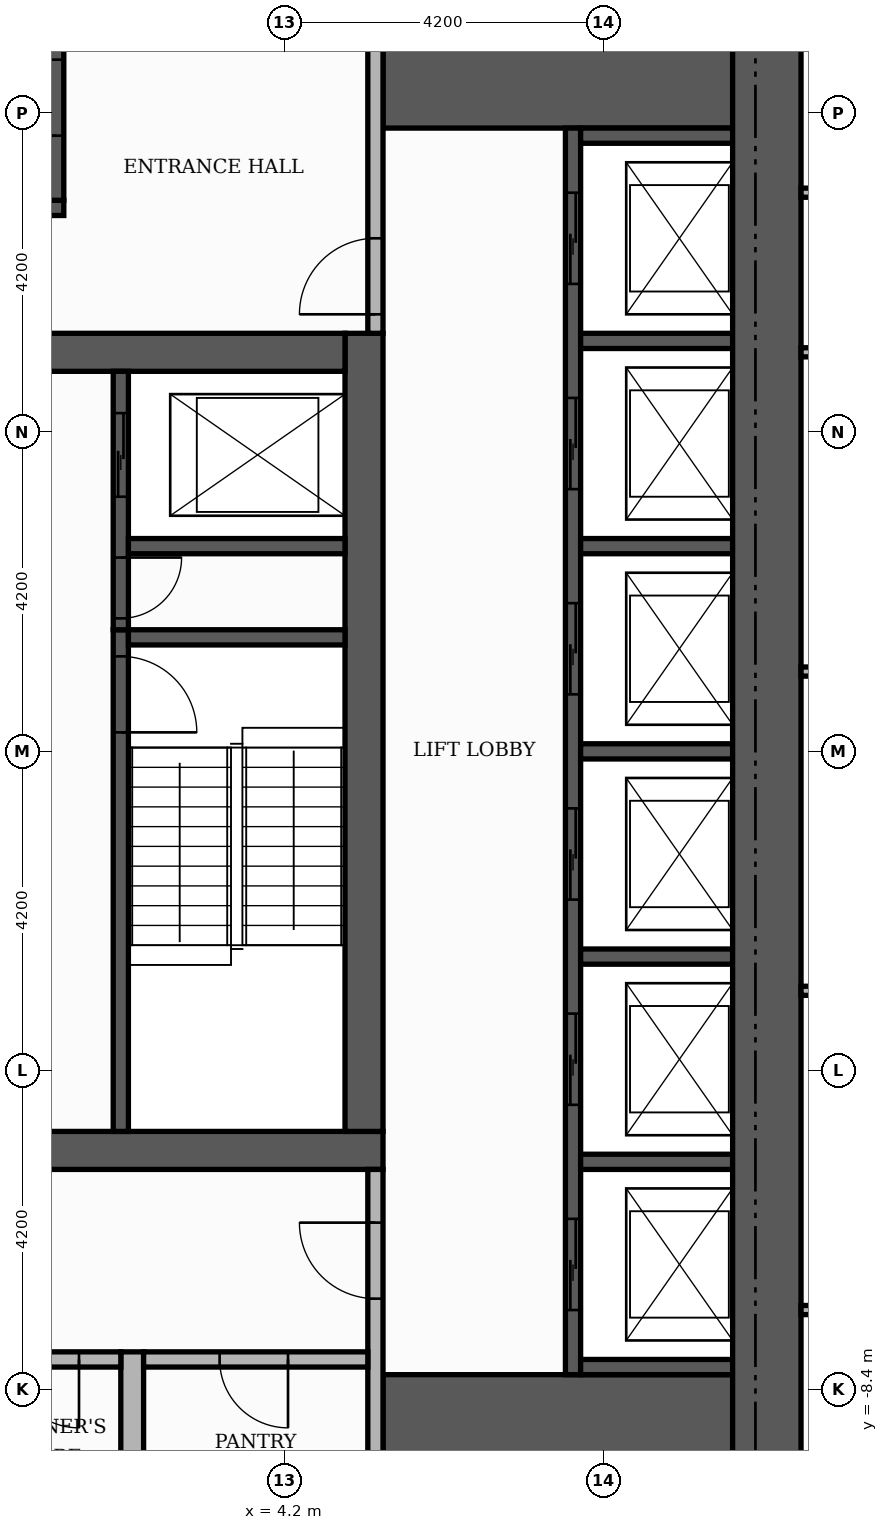
"""IFC4 building model, lengths in metres.
Left out: names, types, materials, properties, quantities, classifications, styles, units other than length and angle.
Written with IfcOpenShell. Run it as: python <this file> out.ifc"""

import sys

from ifc_helpers import new_model, si_unit, direction, frame, frame_2d, origin, place, context, subcontext, project, spatial, rectangle, extrude, element, fill, save


model = new_model("IFC4")
c1 = context("Model", 3, precision=1e-05, world=origin(), true_north=direction((0.0, 1.0)))
c2 = subcontext(c1, "Body", "Model", "MODEL_VIEW")
j1 = project(units=[si_unit("LENGTHUNIT", "METRE"), si_unit("PLANEANGLEUNIT", "RADIAN")], contexts=[c1])
p1 = place(None, origin())
s1 = spatial("IfcSite", under=j1, at=p1, CompositionType="ELEMENT")
p2 = place(p1, origin())
s2 = spatial("IfcBuilding", under=s1, at=p2, CompositionType="ELEMENT")
p3 = place(p2, frame((0.0, 0.0, 248.4)))
s3 = spatial("IfcBuildingStorey", under=s2, at=p3, CompositionType="ELEMENT", Elevation=248.4)
p4 = place(p3, frame((-5.5, -5.25, 0.0), z_axis=(0.0, 0.0, 1.0), x_axis=(1.0, 0.0, 0.0)))
e1 = element("IfcWall", 1, at=p4, inside=s3, PredefinedType="SHEAR", context=c2, shape_type="SweptSolid", body=[
    extrude(rectangle(XDim=11.0, YDim=0.5, at=frame_2d((5.5, 0.0))), origin(), (0.0, 0.0, 1.0), 3.48),
])
p5 = place(p4, frame((4.9, 0.0, 0.0)))
e2 = element("IfcOpeningElement", 2, at=p5, cuts=e1, PredefinedType="OPENING", context=c2, shape_type="SweptSolid", body=[
    extrude(rectangle(XDim=1.2, YDim=2.1, at=frame_2d((0.6, 1.05))), frame((0.0, 0.26, 0.0), z_axis=(0.0, -1.0, 0.0), x_axis=(1.0, 0.0, 0.0)), (0.0, 0.0, 1.0), 0.52),
])
p6 = place(p3, frame((5.25, -5.0, 0.0), z_axis=(0.0, 0.0, 1.0), x_axis=(0.0, 1.0, 0.0)))
e3 = element("IfcWall", 3, at=p6, inside=s3, PredefinedType="SHEAR", context=c2, shape_type="SweptSolid", body=[
    extrude(rectangle(XDim=10.5, YDim=0.5, at=frame_2d((5.25, 0.0))), origin(), (0.0, 0.0, 1.0), 3.48),
])
p7 = place(p3, frame((-5.0, 5.25, 0.0), z_axis=(0.0, 0.0, 1.0), x_axis=(1.0, 0.0, 0.0)))
e4 = element("IfcWall", 4, at=p7, inside=s3, PredefinedType="SHEAR", context=c2, shape_type="SweptSolid", body=[
    extrude(rectangle(XDim=10.0, YDim=0.5, at=frame_2d((5.0, 0.0))), origin(), (0.0, 0.0, 1.0), 3.48),
])
p8 = place(p7, frame((4.4, 0.0, 0.0)))
e5 = element("IfcOpeningElement", 5, at=p8, cuts=e4, PredefinedType="OPENING", context=c2, shape_type="SweptSolid", body=[
    extrude(rectangle(XDim=1.2, YDim=2.1, at=frame_2d((0.6, 1.05))), frame((0.0, 0.26, 0.0), z_axis=(0.0, -1.0, 0.0), x_axis=(1.0, 0.0, 0.0)), (0.0, 0.0, 1.0), 0.52),
])
for number, where, z_axis, x_axis in (
    (6, (5.5, -9.15, 0.0), (0.0, 0.0, 1.0), (1.0, 0.0, 0.0)),
    (7, (5.5, 9.15, 0.0), (0.0, 0.0, 1.0), (1.0, 0.0, 0.0)),
):
    element("IfcWall", number, at=place(p3, frame(where, z_axis=z_axis, x_axis=x_axis)), inside=s3, PredefinedType="SHEAR", context=c2, shape_type="SweptSolid", body=[
        extrude(rectangle(XDim=4.6, YDim=1.9, at=frame_2d((2.3, 0.0))), origin(), (0.0, 0.0, 1.0), 3.48),
    ])
p9 = place(p3, frame((2.05, -5.0, 0.0), z_axis=(0.0, 0.0, 1.0), x_axis=(0.0, 1.0, 0.0)))
e8 = element("IfcWall", 8, at=p9, inside=s3, PredefinedType="SHEAR", context=c2, shape_type="SweptSolid", body=[
    extrude(rectangle(XDim=6.6, YDim=0.2, at=frame_2d((3.3, 0.0))), origin(), (0.0, 0.0, 1.0), 3.48),
])
p10 = place(p9, frame((5.25, 0.0, 0.0)))
e9 = element("IfcOpeningElement", 9, at=p10, cuts=e8, PredefinedType="OPENING", context=c2, shape_type="SweptSolid", body=[
    extrude(rectangle(XDim=1.0, YDim=2.1, at=frame_2d((0.5, 1.05))), frame((0.0, 0.11, 0.0), z_axis=(0.0, -1.0, 0.0), x_axis=(1.0, 0.0, 0.0)), (0.0, 0.0, 1.0), 0.22),
])
p11 = place(p3, frame((2.15, 1.5, 0.0), z_axis=(0.0, 0.0, 1.0), x_axis=(1.0, 0.0, 0.0)))
e10 = element("IfcWall", 10, at=p11, inside=s3, PredefinedType="SHEAR", context=c2, shape_type="SweptSolid", body=[
    extrude(rectangle(XDim=2.85, YDim=0.2, at=frame_2d((1.425, 0.0))), origin(), (0.0, 0.0, 1.0), 3.48),
])
p12 = place(p3, frame((-5.5, 7.15, 0.0), z_axis=(0.0, 0.0, 1.0), x_axis=(1.0, 0.0, 0.0)))
e11 = element("IfcWall", 11, at=p12, inside=s3, PredefinedType="SHEAR", context=c2, shape_type="SweptSolid", body=[
    extrude(rectangle(XDim=6.8, YDim=0.2, at=frame_2d((3.4, 0.0))), origin(), (0.0, 0.0, 1.0), 3.48),
])
p13 = place(p3, frame((1.2, 7.25, 0.0), z_axis=(0.0, 0.0, 1.0), x_axis=(0.0, 1.0, 0.0)))
e12 = element("IfcWall", 12, at=p13, inside=s3, PredefinedType="SHEAR", context=c2, shape_type="SweptSolid", body=[
    extrude(rectangle(XDim=2.85, YDim=0.2, at=frame_2d((1.425, 0.0))), origin(), (0.0, 0.0, 1.0), 3.48),
])
p14 = place(p13, frame((0.85, 0.0, 0.0)))
e13 = element("IfcOpeningElement", 13, at=p14, cuts=e12, PredefinedType="OPENING", context=c2, shape_type="SweptSolid", body=[
    extrude(rectangle(XDim=1.0, YDim=2.1, at=frame_2d((0.5, 1.05))), frame((0.0, 0.11, 0.0), z_axis=(0.0, -1.0, 0.0), x_axis=(1.0, 0.0, 0.0)), (0.0, 0.0, 1.0), 0.22),
])
p15 = place(p3, frame((8.0, -8.2, 0.0), z_axis=(0.0, 0.0, 1.0), x_axis=(0.0, 1.0, 0.0)))
e14 = element("IfcWall", 14, at=p15, inside=s3, PredefinedType="SHEAR", context=c2, shape_type="SweptSolid", body=[
    extrude(rectangle(XDim=16.4, YDim=0.2, at=frame_2d((8.2, 0.0))), origin(), (0.0, 0.0, 1.0), 3.48),
])
p16 = place(p15, frame((0.85, 0.0, 0.0)))
e15 = element("IfcOpeningElement", 15, at=p16, cuts=e14, PredefinedType="OPENING", context=c2, shape_type="SweptSolid", body=[
    extrude(rectangle(XDim=1.2, YDim=2.1, at=frame_2d((0.6, 1.05))), frame((0.0, 0.11, 0.0), z_axis=(0.0, -1.0, 0.0), x_axis=(1.0, 0.0, 0.0)), (0.0, 0.0, 1.0), 0.22),
])
p17 = place(p15, frame((3.55, 0.0, 0.0)))
e16 = element("IfcOpeningElement", 16, at=p17, cuts=e14, PredefinedType="OPENING", context=c2, shape_type="SweptSolid", body=[
    extrude(rectangle(XDim=1.2, YDim=2.1, at=frame_2d((0.6, 1.05))), frame((0.0, 0.11, 0.0), z_axis=(0.0, -1.0, 0.0), x_axis=(1.0, 0.0, 0.0)), (0.0, 0.0, 1.0), 0.22),
])
p18 = place(p15, frame((6.25, 0.0, 0.0)))
e17 = element("IfcOpeningElement", 17, at=p18, cuts=e14, PredefinedType="OPENING", context=c2, shape_type="SweptSolid", body=[
    extrude(rectangle(XDim=1.2, YDim=2.1, at=frame_2d((0.6, 1.05))), frame((0.0, 0.11, 0.0), z_axis=(0.0, -1.0, 0.0), x_axis=(1.0, 0.0, 0.0)), (0.0, 0.0, 1.0), 0.22),
])
p19 = place(p15, frame((8.95, 0.0, 0.0)))
e18 = element("IfcOpeningElement", 18, at=p19, cuts=e14, PredefinedType="OPENING", context=c2, shape_type="SweptSolid", body=[
    extrude(rectangle(XDim=1.2, YDim=2.1, at=frame_2d((0.6, 1.05))), frame((0.0, 0.11, 0.0), z_axis=(0.0, -1.0, 0.0), x_axis=(1.0, 0.0, 0.0)), (0.0, 0.0, 1.0), 0.22),
])
p20 = place(p15, frame((11.65, 0.0, 0.0)))
e19 = element("IfcOpeningElement", 19, at=p20, cuts=e14, PredefinedType="OPENING", context=c2, shape_type="SweptSolid", body=[
    extrude(rectangle(XDim=1.2, YDim=2.1, at=frame_2d((0.6, 1.05))), frame((0.0, 0.11, 0.0), z_axis=(0.0, -1.0, 0.0), x_axis=(1.0, 0.0, 0.0)), (0.0, 0.0, 1.0), 0.22),
])
p21 = place(p15, frame((14.35, 0.0, 0.0)))
e20 = element("IfcOpeningElement", 20, at=p21, cuts=e14, PredefinedType="OPENING", context=c2, shape_type="SweptSolid", body=[
    extrude(rectangle(XDim=1.2, YDim=2.1, at=frame_2d((0.6, 1.05))), frame((0.0, 0.11, 0.0), z_axis=(0.0, -1.0, 0.0), x_axis=(1.0, 0.0, 0.0)), (0.0, 0.0, 1.0), 0.22),
])
for number, where, z_axis, x_axis in (
    (21, (8.1, -8.1, 0.0), (0.0, 0.0, 1.0), (1.0, 0.0, 0.0)),
    (22, (8.1, -5.4, 0.0), (0.0, 0.0, 1.0), (1.0, 0.0, 0.0)),
    (23, (8.1, -2.7, 0.0), (0.0, 0.0, 1.0), (1.0, 0.0, 0.0)),
    (24, (8.1, 0.0, 0.0), (0.0, 0.0, 1.0), (1.0, 0.0, 0.0)),
):
    element("IfcWall", number, at=place(p3, frame(where, z_axis=z_axis, x_axis=x_axis)), inside=s3, PredefinedType="SHEAR", context=c2, shape_type="SweptSolid", body=[
        extrude(rectangle(XDim=2.0, YDim=0.2, at=frame_2d((1.0, 0.0))), origin(), (0.0, 0.0, 1.0), 3.48),
    ])
p22 = place(p3, frame((2.05, 1.6, 0.0), z_axis=(0.0, 0.0, 1.0), x_axis=(0.0, 1.0, 0.0)))
e25 = element("IfcWall", 25, at=p22, inside=s3, PredefinedType="SHEAR", context=c2, shape_type="SweptSolid", body=[
    extrude(rectangle(XDim=3.4, YDim=0.2, at=frame_2d((1.7, 0.0))), origin(), (0.0, 0.0, 1.0), 3.48),
])
p23 = place(p22, frame((1.75, 0.0, 0.0)))
e26 = element("IfcOpeningElement", 26, at=p23, cuts=e25, PredefinedType="OPENING", context=c2, shape_type="SweptSolid", body=[
    extrude(rectangle(XDim=1.1, YDim=2.1, at=frame_2d((0.55, 1.05))), frame((0.0, 0.11, 0.0), z_axis=(0.0, -1.0, 0.0), x_axis=(1.0, 0.0, 0.0)), (0.0, 0.0, 1.0), 0.22),
])
p24 = place(p22, frame((0.15, 0.0, 0.0)))
e27 = element("IfcOpeningElement", 27, at=p24, cuts=e25, PredefinedType="OPENING", context=c2, shape_type="SweptSolid", body=[
    extrude(rectangle(XDim=0.8, YDim=2.1, at=frame_2d((0.4, 1.05))), frame((0.0, 0.11, 0.0), z_axis=(0.0, -1.0, 0.0), x_axis=(1.0, 0.0, 0.0)), (0.0, 0.0, 1.0), 0.22),
])
p25 = place(p3, frame((2.15, 2.7, 0.0), z_axis=(0.0, 0.0, 1.0), x_axis=(1.0, 0.0, 0.0)))
e28 = element("IfcWall", 28, at=p25, inside=s3, PredefinedType="SHEAR", context=c2, shape_type="SweptSolid", body=[
    extrude(rectangle(XDim=2.85, YDim=0.2, at=frame_2d((1.425, 0.0))), origin(), (0.0, 0.0, 1.0), 3.48),
])
for number, where, z_axis, x_axis in (
    (29, (8.1, 2.7, 0.0), (0.0, 0.0, 1.0), (1.0, 0.0, 0.0)),
    (30, (8.1, 5.4, 0.0), (0.0, 0.0, 1.0), (1.0, 0.0, 0.0)),
    (31, (8.1, 8.1, 0.0), (0.0, 0.0, 1.0), (1.0, 0.0, 0.0)),
):
    element("IfcWall", number, at=place(p3, frame(where, z_axis=z_axis, x_axis=x_axis)), inside=s3, PredefinedType="SHEAR", context=c2, shape_type="SweptSolid", body=[
        extrude(rectangle(XDim=2.0, YDim=0.2, at=frame_2d((1.0, 0.0))), origin(), (0.0, 0.0, 1.0), 3.48),
    ])
p26 = place(p3, frame((10.55, -10.1, 0.0), z_axis=(0.0, 0.0, 1.0), x_axis=(0.0, 1.0, 0.0)))
e32 = element("IfcWall", 32, at=p26, inside=s3, PredefinedType="SHEAR", context=c2, shape_type="SweptSolid", body=[
    extrude(rectangle(XDim=20.2, YDim=0.9, at=frame_2d((10.1, 0.0))), origin(), (0.0, 0.0, 1.0), 3.48),
])
p27 = place(p3, frame((2.2, -10.1, 0.0), z_axis=(0.0, 0.0, 1.0), x_axis=(0.0, 1.0, 0.0)))
e33 = element("IfcWall", 33, at=p27, inside=s3, PredefinedType="PARTITIONING", context=c2, shape_type="SweptSolid", body=[
    extrude(rectangle(XDim=2.2, YDim=0.3, at=frame_2d((1.1, 0.0))), origin(), (0.0, 0.0, 1.0), 3.48),
])
p28 = place(p3, frame((5.4, -10.1, 0.0), z_axis=(0.0, 0.0, 1.0), x_axis=(0.0, 1.0, 0.0)))
e34 = element("IfcWall", 34, at=p28, inside=s3, PredefinedType="PARTITIONING", context=c2, shape_type="SweptSolid", body=[
    extrude(rectangle(XDim=4.6, YDim=0.2, at=frame_2d((2.3, 0.0))), origin(), (0.0, 0.0, 1.0), 3.48),
])
p29 = place(p28, frame((2.9, 0.0, 0.0)))
e35 = element("IfcOpeningElement", 35, at=p29, cuts=e34, PredefinedType="OPENING", context=c2, shape_type="SweptSolid", body=[
    extrude(rectangle(XDim=1.0, YDim=2.1, at=frame_2d((0.5, 1.05))), frame((0.0, 0.11, 0.0), z_axis=(0.0, -1.0, 0.0), x_axis=(1.0, 0.0, 0.0)), (0.0, 0.0, 1.0), 0.22),
])
p30 = place(p3, frame((0.1, -8.0, 0.0), z_axis=(0.0, 0.0, 1.0), x_axis=(1.0, 0.0, 0.0)))
e36 = element("IfcWall", 36, at=p30, inside=s3, PredefinedType="PARTITIONING", context=c2, shape_type="SweptSolid", body=[
    extrude(rectangle(XDim=1.95, YDim=0.2, at=frame_2d((0.975, 0.0))), origin(), (0.0, 0.0, 1.0), 3.48),
])
p31 = place(p30, frame((0.5, 0.0, 0.0)))
e37 = element("IfcOpeningElement", 37, at=p31, cuts=e36, PredefinedType="OPENING", context=c2, shape_type="SweptSolid", body=[
    extrude(rectangle(XDim=0.9, YDim=2.1, at=frame_2d((0.45, 1.05))), frame((0.0, 0.11, 0.0), z_axis=(0.0, -1.0, 0.0), x_axis=(1.0, 0.0, 0.0)), (0.0, 0.0, 1.0), 0.22),
])
p32 = place(p3, frame((2.35, -8.0, 0.0), z_axis=(0.0, 0.0, 1.0), x_axis=(1.0, 0.0, 0.0)))
e38 = element("IfcWall", 38, at=p32, inside=s3, PredefinedType="PARTITIONING", context=c2, shape_type="SweptSolid", body=[
    extrude(rectangle(XDim=2.95, YDim=0.2, at=frame_2d((1.475, 0.0))), origin(), (0.0, 0.0, 1.0), 3.48),
])
p33 = place(p32, frame((1.0, 0.0, 0.0)))
e39 = element("IfcOpeningElement", 39, at=p33, cuts=e38, PredefinedType="OPENING", context=c2, shape_type="SweptSolid", body=[
    extrude(rectangle(XDim=0.9, YDim=2.1, at=frame_2d((0.45, 1.05))), frame((0.0, 0.11, 0.0), z_axis=(0.0, -1.0, 0.0), x_axis=(1.0, 0.0, 0.0)), (0.0, 0.0, 1.0), 0.22),
])
p34 = place(p3, frame((5.4, 5.5, 0.0), z_axis=(0.0, 0.0, 1.0), x_axis=(0.0, 1.0, 0.0)))
e40 = element("IfcWall", 40, at=p34, inside=s3, PredefinedType="PARTITIONING", context=c2, shape_type="SweptSolid", body=[
    extrude(rectangle(XDim=4.6, YDim=0.2, at=frame_2d((2.3, 0.0))), origin(), (0.0, 0.0, 1.0), 3.48),
])
p35 = place(p34, frame((0.25, 0.0, 0.0)))
e41 = element("IfcOpeningElement", 41, at=p35, cuts=e40, PredefinedType="OPENING", context=c2, shape_type="SweptSolid", body=[
    extrude(rectangle(XDim=1.0, YDim=2.1, at=frame_2d((0.5, 1.05))), frame((0.0, 0.11, 0.0), z_axis=(0.0, -1.0, 0.0), x_axis=(1.0, 0.0, 0.0)), (0.0, 0.0, 1.0), 0.22),
])
p36 = place(p3, frame((11.0, -7.35, 0.0), z_axis=(0.0, 0.0, 1.0), x_axis=(1.0, 0.0, 0.0)))
e42 = element("IfcWall", 42, at=p36, inside=s3, PredefinedType="PARTITIONING", context=c2, shape_type="SweptSolid", body=[
    extrude(rectangle(XDim=8.22, YDim=0.12, at=frame_2d((4.11, 0.0))), origin(), (0.0, 0.0, 1.0), 3.48),
])
p37 = place(p36, frame((3.66, 0.0, 0.0)))
e43 = element("IfcOpeningElement", 43, at=p37, cuts=e42, PredefinedType="OPENING", context=c2, shape_type="SweptSolid", body=[
    extrude(rectangle(XDim=0.9, YDim=2.1, at=frame_2d((0.45, 1.05))), frame((0.0, 0.07, 0.0), z_axis=(0.0, -1.0, 0.0), x_axis=(1.0, 0.0, 0.0)), (0.0, 0.0, 1.0), 0.14),
])
for number, where, z_axis, x_axis in (
    (44, (11.0, -3.15, 0.0), (0.0, 0.0, 1.0), (1.0, 0.0, 0.0)),
    (45, (11.0, 1.05, 0.0), (0.0, 0.0, 1.0), (1.0, 0.0, 0.0)),
    (46, (11.0, 5.25, 0.0), (0.0, 0.0, 1.0), (1.0, 0.0, 0.0)),
    (47, (11.0, 7.35, 0.0), (0.0, 0.0, 1.0), (1.0, 0.0, 0.0)),
):
    element("IfcWall", number, at=place(p3, frame(where, z_axis=z_axis, x_axis=x_axis)), inside=s3, PredefinedType="PARTITIONING", context=c2, shape_type="SweptSolid", body=[
        extrude(rectangle(XDim=8.22, YDim=0.12, at=frame_2d((4.11, 0.0))), origin(), (0.0, 0.0, 1.0), 3.48),
    ])
p38 = place(p16, origin())
e48 = element("IfcDoor", 48, at=p38, inside=s3, OperationType="SLIDING_TO_LEFT", PredefinedType="DOOR", context=c2, shape_type="SweptSolid", body=[
    extrude(rectangle(XDim=1.2, YDim=2.1, at=frame_2d((0.6, 1.05))), frame((0.0, 0.025, 0.0), z_axis=(0.0, -1.0, 0.0), x_axis=(1.0, 0.0, 0.0)), (0.0, 0.0, 1.0), 0.05),
])
fill(e15, e48)
p39 = place(p17, origin())
e49 = element("IfcDoor", 49, at=p39, inside=s3, OperationType="SLIDING_TO_LEFT", PredefinedType="DOOR", context=c2, shape_type="SweptSolid", body=[
    extrude(rectangle(XDim=1.2, YDim=2.1, at=frame_2d((0.6, 1.05))), frame((0.0, 0.025, 0.0), z_axis=(0.0, -1.0, 0.0), x_axis=(1.0, 0.0, 0.0)), (0.0, 0.0, 1.0), 0.05),
])
fill(e16, e49)
p40 = place(p18, origin())
e50 = element("IfcDoor", 50, at=p40, inside=s3, OperationType="SLIDING_TO_LEFT", PredefinedType="DOOR", context=c2, shape_type="SweptSolid", body=[
    extrude(rectangle(XDim=1.2, YDim=2.1, at=frame_2d((0.6, 1.05))), frame((0.0, 0.025, 0.0), z_axis=(0.0, -1.0, 0.0), x_axis=(1.0, 0.0, 0.0)), (0.0, 0.0, 1.0), 0.05),
])
fill(e17, e50)
p41 = place(p19, origin())
e51 = element("IfcDoor", 51, at=p41, inside=s3, OperationType="SLIDING_TO_LEFT", PredefinedType="DOOR", context=c2, shape_type="SweptSolid", body=[
    extrude(rectangle(XDim=1.2, YDim=2.1, at=frame_2d((0.6, 1.05))), frame((0.0, 0.025, 0.0), z_axis=(0.0, -1.0, 0.0), x_axis=(1.0, 0.0, 0.0)), (0.0, 0.0, 1.0), 0.05),
])
fill(e18, e51)
p42 = place(p20, origin())
e52 = element("IfcDoor", 52, at=p42, inside=s3, OperationType="SLIDING_TO_LEFT", PredefinedType="DOOR", context=c2, shape_type="SweptSolid", body=[
    extrude(rectangle(XDim=1.2, YDim=2.1, at=frame_2d((0.6, 1.05))), frame((0.0, 0.025, 0.0), z_axis=(0.0, -1.0, 0.0), x_axis=(1.0, 0.0, 0.0)), (0.0, 0.0, 1.0), 0.05),
])
fill(e19, e52)
p43 = place(p21, origin())
e53 = element("IfcDoor", 53, at=p43, inside=s3, OperationType="SLIDING_TO_LEFT", PredefinedType="DOOR", context=c2, shape_type="SweptSolid", body=[
    extrude(rectangle(XDim=1.2, YDim=2.1, at=frame_2d((0.6, 1.05))), frame((0.0, 0.025, 0.0), z_axis=(0.0, -1.0, 0.0), x_axis=(1.0, 0.0, 0.0)), (0.0, 0.0, 1.0), 0.05),
])
fill(e20, e53)
p44 = place(p23, origin())
e54 = element("IfcDoor", 54, at=p44, inside=s3, OperationType="SLIDING_TO_LEFT", PredefinedType="DOOR", context=c2, shape_type="SweptSolid", body=[
    extrude(rectangle(XDim=1.1, YDim=2.1, at=frame_2d((0.55, 1.05))), frame((0.0, 0.025, 0.0), z_axis=(0.0, -1.0, 0.0), x_axis=(1.0, 0.0, 0.0)), (0.0, 0.0, 1.0), 0.05),
])
fill(e26, e54)
p45 = place(p10, frame((1.0, 0.0, 0.0), z_axis=(0.0, 0.0, 1.0), x_axis=(-1.0, 0.0, 0.0)))
e55 = element("IfcDoor", 55, at=p45, inside=s3, OperationType="SINGLE_SWING_LEFT", PredefinedType="DOOR", context=c2, shape_type="SweptSolid", body=[
    extrude(rectangle(XDim=1.0, YDim=2.1, at=frame_2d((0.5, 1.05))), frame((0.0, 0.025, 0.0), z_axis=(0.0, -1.0, 0.0), x_axis=(1.0, 0.0, 0.0)), (0.0, 0.0, 1.0), 0.05),
])
fill(e9, e55)
p46 = place(p24, frame((0.8, 0.0, 0.0), z_axis=(0.0, 0.0, 1.0), x_axis=(-1.0, 0.0, 0.0)))
e56 = element("IfcDoor", 56, at=p46, inside=s3, OperationType="SINGLE_SWING_RIGHT", PredefinedType="DOOR", context=c2, shape_type="SweptSolid", body=[
    extrude(rectangle(XDim=0.8, YDim=2.1, at=frame_2d((0.4, 1.05))), frame((0.0, 0.025, 0.0), z_axis=(0.0, -1.0, 0.0), x_axis=(1.0, 0.0, 0.0)), (0.0, 0.0, 1.0), 0.05),
])
fill(e27, e56)
p47 = place(p14, origin())
e57 = element("IfcDoor", 57, at=p47, inside=s3, OperationType="SINGLE_SWING_LEFT", PredefinedType="DOOR", context=c2, shape_type="SweptSolid", body=[
    extrude(rectangle(XDim=1.0, YDim=2.1, at=frame_2d((0.5, 1.05))), frame((0.0, 0.025, 0.0), z_axis=(0.0, -1.0, 0.0), x_axis=(1.0, 0.0, 0.0)), (0.0, 0.0, 1.0), 0.05),
])
fill(e13, e57)
p48 = place(p35, origin())
e58 = element("IfcDoor", 58, at=p48, inside=s3, OperationType="SINGLE_SWING_LEFT", PredefinedType="DOOR", context=c2, shape_type="SweptSolid", body=[
    extrude(rectangle(XDim=1.0, YDim=2.1, at=frame_2d((0.5, 1.05))), frame((0.0, 0.025, 0.0), z_axis=(0.0, -1.0, 0.0), x_axis=(1.0, 0.0, 0.0)), (0.0, 0.0, 1.0), 0.05),
])
fill(e41, e58)
p49 = place(p29, origin())
e59 = element("IfcDoor", 59, at=p49, inside=s3, OperationType="SINGLE_SWING_RIGHT", PredefinedType="DOOR", context=c2, shape_type="SweptSolid", body=[
    extrude(rectangle(XDim=1.0, YDim=2.1, at=frame_2d((0.5, 1.05))), frame((0.0, 0.025, 0.0), z_axis=(0.0, -1.0, 0.0), x_axis=(1.0, 0.0, 0.0)), (0.0, 0.0, 1.0), 0.05),
])
fill(e35, e59)
p50 = place(p31, frame((0.9, 0.0, 0.0), z_axis=(0.0, 0.0, 1.0), x_axis=(-1.0, 0.0, 0.0)))
e60 = element("IfcDoor", 60, at=p50, inside=s3, OperationType="SINGLE_SWING_RIGHT", PredefinedType="DOOR", context=c2, shape_type="SweptSolid", body=[
    extrude(rectangle(XDim=0.9, YDim=2.1, at=frame_2d((0.45, 1.05))), frame((0.0, 0.025, 0.0), z_axis=(0.0, -1.0, 0.0), x_axis=(1.0, 0.0, 0.0)), (0.0, 0.0, 1.0), 0.05),
])
fill(e37, e60)
p51 = place(p33, frame((0.9, 0.0, 0.0), z_axis=(0.0, 0.0, 1.0), x_axis=(-1.0, 0.0, 0.0)))
e61 = element("IfcDoor", 61, at=p51, inside=s3, OperationType="SINGLE_SWING_RIGHT", PredefinedType="DOOR", context=c2, shape_type="SweptSolid", body=[
    extrude(rectangle(XDim=0.9, YDim=2.1, at=frame_2d((0.45, 1.05))), frame((0.0, 0.025, 0.0), z_axis=(0.0, -1.0, 0.0), x_axis=(1.0, 0.0, 0.0)), (0.0, 0.0, 1.0), 0.05),
])
fill(e39, e61)
save(model, sys.argv[1])
